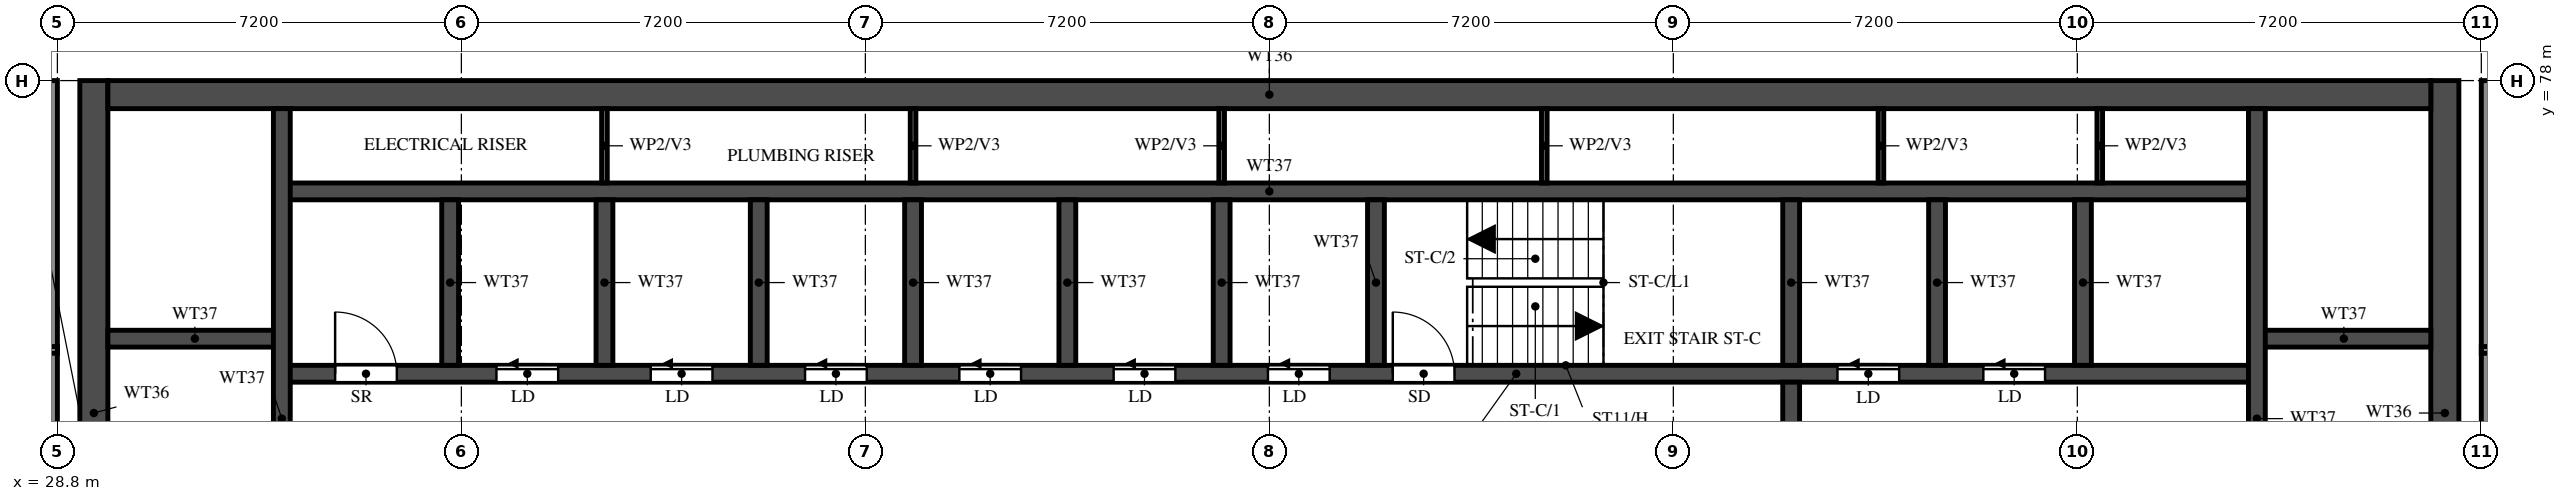
"""IFC4 building model, lengths in metres.
Left out: names, types, materials, properties, quantities, classifications, styles, units other than length and angle.
Written with IfcOpenShell. Run it as: python <this file> out.ifc"""

import sys

from ifc_helpers import new_model, si_unit, direction, frame, frame_2d, origin, place, context, subcontext, project, spatial, rectangle, extrude, element, fill, save


model = new_model("IFC4")
c1 = context("Model", 3, precision=1e-05, world=origin(), true_north=direction((0.0, 1.0)))
c2 = subcontext(c1, "Body", "Model", "MODEL_VIEW")
j1 = project(units=[si_unit("LENGTHUNIT", "METRE"), si_unit("PLANEANGLEUNIT", "RADIAN")], contexts=[c1])
p1 = place(None, origin())
s1 = spatial("IfcSite", under=j1, at=p1, CompositionType="ELEMENT")
p2 = place(p1, origin())
s2 = spatial("IfcBuilding", under=s1, at=p2, CompositionType="ELEMENT")
p3 = place(p2, frame((0.0, 0.0, 239.5)))
s3 = spatial("IfcBuildingStorey", under=s2, at=p3, CompositionType="ELEMENT", Elevation=239.5)
for number, where, z_axis, x_axis in (
    (1, (29.45, 66.15, 0.0), (0.0, 0.0, 1.0), (0.0, 1.0, 0.0)),
    (2, (71.35, 66.15, 0.0), (0.0, 0.0, 1.0), (0.0, 1.0, 0.0)),
):
    element("IfcWall", number, at=place(p3, frame(where, z_axis=z_axis, x_axis=x_axis)), inside=s3, PredefinedType="SHEAR", context=c2, shape_type="SweptSolid", body=[
        extrude(rectangle(XDim=11.85, YDim=0.5, at=frame_2d((5.925, 0.0))), origin(), (0.0, 0.0, 1.0), 3.22),
    ])
p4 = place(p3, frame((29.7, 77.75, 0.0), z_axis=(0.0, 0.0, 1.0), x_axis=(1.0, 0.0, 0.0)))
e3 = element("IfcWall", 3, at=p4, inside=s3, PredefinedType="SHEAR", context=c2, shape_type="SweptSolid", body=[
    extrude(rectangle(XDim=41.4, YDim=0.5, at=frame_2d((20.7, 0.0))), origin(), (0.0, 0.0, 1.0), 3.22),
])
p5 = place(p3, frame((32.8, 72.775, 0.0), z_axis=(0.0, 0.0, 1.0), x_axis=(1.0, 0.0, 0.0)))
e4 = element("IfcWall", 4, at=p5, inside=s3, PredefinedType="SHEAR", context=c2, shape_type="SweptSolid", body=[
    extrude(rectangle(XDim=35.2, YDim=0.3, at=frame_2d((17.6, 0.0))), origin(), (0.0, 0.0, 1.0), 3.22),
])
p6 = place(p5, frame((19.8, 0.0, 0.0)))
e5 = element("IfcOpeningElement", 5, at=p6, cuts=e4, PredefinedType="OPENING", context=c2, shape_type="SweptSolid", body=[
    extrude(rectangle(XDim=1.1, YDim=2.1, at=frame_2d((0.55, 1.05))), frame((0.0, 0.16, 0.0), z_axis=(0.0, -1.0, 0.0), x_axis=(1.0, 0.0, 0.0)), (0.0, 0.0, 1.0), 0.32),
])
p7 = place(p5, frame((27.725, 0.0, 0.0)))
e6 = element("IfcOpeningElement", 6, at=p7, cuts=e4, PredefinedType="OPENING", context=c2, shape_type="SweptSolid", body=[
    extrude(rectangle(XDim=1.1, YDim=2.1, at=frame_2d((0.55, 1.05))), frame((0.0, 0.16, 0.0), z_axis=(0.0, -1.0, 0.0), x_axis=(1.0, 0.0, 0.0)), (0.0, 0.0, 1.0), 0.32),
])
p8 = place(p5, frame((30.325, 0.0, 0.0)))
e7 = element("IfcOpeningElement", 7, at=p8, cuts=e4, PredefinedType="OPENING", context=c2, shape_type="SweptSolid", body=[
    extrude(rectangle(XDim=1.1, YDim=2.1, at=frame_2d((0.55, 1.05))), frame((0.0, 0.16, 0.0), z_axis=(0.0, -1.0, 0.0), x_axis=(1.0, 0.0, 0.0)), (0.0, 0.0, 1.0), 0.32),
])
p9 = place(p5, frame((3.825, 0.0, 0.0)))
e8 = element("IfcOpeningElement", 8, at=p9, cuts=e4, PredefinedType="OPENING", context=c2, shape_type="SweptSolid", body=[
    extrude(rectangle(XDim=1.1, YDim=2.1, at=frame_2d((0.55, 1.05))), frame((0.0, 0.16, 0.0), z_axis=(0.0, -1.0, 0.0), x_axis=(1.0, 0.0, 0.0)), (0.0, 0.0, 1.0), 0.32),
])
p10 = place(p5, frame((6.575, 0.0, 0.0)))
e9 = element("IfcOpeningElement", 9, at=p10, cuts=e4, PredefinedType="OPENING", context=c2, shape_type="SweptSolid", body=[
    extrude(rectangle(XDim=1.1, YDim=2.1, at=frame_2d((0.55, 1.05))), frame((0.0, 0.16, 0.0), z_axis=(0.0, -1.0, 0.0), x_axis=(1.0, 0.0, 0.0)), (0.0, 0.0, 1.0), 0.32),
])
p11 = place(p5, frame((9.325, 0.0, 0.0)))
e10 = element("IfcOpeningElement", 10, at=p11, cuts=e4, PredefinedType="OPENING", context=c2, shape_type="SweptSolid", body=[
    extrude(rectangle(XDim=1.1, YDim=2.1, at=frame_2d((0.55, 1.05))), frame((0.0, 0.16, 0.0), z_axis=(0.0, -1.0, 0.0), x_axis=(1.0, 0.0, 0.0)), (0.0, 0.0, 1.0), 0.32),
])
p12 = place(p5, frame((12.075, 0.0, 0.0)))
e11 = element("IfcOpeningElement", 11, at=p12, cuts=e4, PredefinedType="OPENING", context=c2, shape_type="SweptSolid", body=[
    extrude(rectangle(XDim=1.1, YDim=2.1, at=frame_2d((0.55, 1.05))), frame((0.0, 0.16, 0.0), z_axis=(0.0, -1.0, 0.0), x_axis=(1.0, 0.0, 0.0)), (0.0, 0.0, 1.0), 0.32),
])
p13 = place(p5, frame((14.825, 0.0, 0.0)))
e12 = element("IfcOpeningElement", 12, at=p13, cuts=e4, PredefinedType="OPENING", context=c2, shape_type="SweptSolid", body=[
    extrude(rectangle(XDim=1.1, YDim=2.1, at=frame_2d((0.55, 1.05))), frame((0.0, 0.16, 0.0), z_axis=(0.0, -1.0, 0.0), x_axis=(1.0, 0.0, 0.0)), (0.0, 0.0, 1.0), 0.32),
])
p14 = place(p5, frame((17.575, 0.0, 0.0)))
e13 = element("IfcOpeningElement", 13, at=p14, cuts=e4, PredefinedType="OPENING", context=c2, shape_type="SweptSolid", body=[
    extrude(rectangle(XDim=1.1, YDim=2.1, at=frame_2d((0.55, 1.05))), frame((0.0, 0.16, 0.0), z_axis=(0.0, -1.0, 0.0), x_axis=(1.0, 0.0, 0.0)), (0.0, 0.0, 1.0), 0.32),
])
p15 = place(p5, frame((0.95, 0.0, 0.0)))
e14 = element("IfcOpeningElement", 14, at=p15, cuts=e4, PredefinedType="OPENING", context=c2, shape_type="SweptSolid", body=[
    extrude(rectangle(XDim=1.1, YDim=2.1, at=frame_2d((0.55, 1.05))), frame((0.0, 0.16, 0.0), z_axis=(0.0, -1.0, 0.0), x_axis=(1.0, 0.0, 0.0)), (0.0, 0.0, 1.0), 0.32),
])
p16 = place(p3, frame((32.8, 76.025, 0.0), z_axis=(0.0, 0.0, 1.0), x_axis=(1.0, 0.0, 0.0)))
e15 = element("IfcWall", 15, at=p16, inside=s3, PredefinedType="SHEAR", context=c2, shape_type="SweptSolid", body=[
    extrude(rectangle(XDim=35.2, YDim=0.3, at=frame_2d((17.6, 0.0))), origin(), (0.0, 0.0, 1.0), 3.22),
])
for number, where, z_axis, x_axis in (
    (16, (29.7, 73.4, 0.0), (0.0, 0.0, 1.0), (1.0, 0.0, 0.0)),
    (17, (68.0, 73.4, 0.0), (0.0, 0.0, 1.0), (1.0, 0.0, 0.0)),
):
    element("IfcWall", number, at=place(p3, frame(where, z_axis=z_axis, x_axis=x_axis)), inside=s3, PredefinedType="SHEAR", context=c2, shape_type="SweptSolid", body=[
        extrude(rectangle(XDim=3.1, YDim=0.3, at=frame_2d((1.55, 0.0))), origin(), (0.0, 0.0, 1.0), 3.22),
    ])
p17 = place(p3, frame((32.8, 66.45, 0.0), z_axis=(0.0, 0.0, 1.0), x_axis=(0.0, 1.0, 0.0)))
e18 = element("IfcWall", 18, at=p17, inside=s3, PredefinedType="SHEAR", context=c2, shape_type="SweptSolid", body=[
    extrude(rectangle(XDim=11.05, YDim=0.3, at=frame_2d((5.525, 0.0))), origin(), (0.0, 0.0, 1.0), 3.22),
])
p18 = place(p3, frame((68.0, 66.45, 0.0), z_axis=(0.0, 0.0, 1.0), x_axis=(0.0, 1.0, 0.0)))
e19 = element("IfcWall", 19, at=p18, inside=s3, PredefinedType="SHEAR", context=c2, shape_type="SweptSolid", body=[
    extrude(rectangle(XDim=11.05, YDim=0.3, at=frame_2d((5.525, 0.0))), origin(), (0.0, 0.0, 1.0), 3.22),
])
p19 = place(p18, frame((0.15, 0.0, 0.0)))
e20 = element("IfcOpeningElement", 20, at=p19, cuts=e19, PredefinedType="OPENING", context=c2, shape_type="SweptSolid", body=[
    extrude(rectangle(XDim=1.1, YDim=2.1, at=frame_2d((0.55, 1.05))), frame((0.0, 0.16, 0.0), z_axis=(0.0, -1.0, 0.0), x_axis=(1.0, 0.0, 0.0)), (0.0, 0.0, 1.0), 0.32),
])
p20 = place(p3, frame((59.7, 66.45, 0.0), z_axis=(0.0, 0.0, 1.0), x_axis=(0.0, 1.0, 0.0)))
e21 = element("IfcWall", 21, at=p20, inside=s3, PredefinedType="SHEAR", context=c2, shape_type="SweptSolid", body=[
    extrude(rectangle(XDim=6.175, YDim=0.3, at=frame_2d((3.087, 0.0))), origin(), (0.0, 0.0, 1.0), 3.22),
])
p21 = place(p20, frame((3.85, 0.0, 0.0)))
e22 = element("IfcOpeningElement", 22, at=p21, cuts=e21, PredefinedType="OPENING", context=c2, shape_type="SweptSolid", body=[
    extrude(rectangle(XDim=1.2, YDim=2.1, at=frame_2d((0.6, 1.05))), frame((0.0, 0.16, 0.0), z_axis=(0.0, -1.0, 0.0), x_axis=(1.0, 0.0, 0.0)), (0.0, 0.0, 1.0), 0.32),
])
for number, where, z_axis, x_axis in (
    (23, (59.7, 72.925, 0.0), (0.0, 0.0, 1.0), (0.0, 1.0, 0.0)),
    (24, (35.8, 72.925, 0.0), (0.0, 0.0, 1.0), (0.0, 1.0, 0.0)),
    (25, (38.55, 72.925, 0.0), (0.0, 0.0, 1.0), (0.0, 1.0, 0.0)),
    (26, (41.3, 72.925, 0.0), (0.0, 0.0, 1.0), (0.0, 1.0, 0.0)),
    (27, (44.05, 72.925, 0.0), (0.0, 0.0, 1.0), (0.0, 1.0, 0.0)),
    (28, (46.8, 72.925, 0.0), (0.0, 0.0, 1.0), (0.0, 1.0, 0.0)),
    (29, (49.55, 72.925, 0.0), (0.0, 0.0, 1.0), (0.0, 1.0, 0.0)),
    (30, (52.3, 72.925, 0.0), (0.0, 0.0, 1.0), (0.0, 1.0, 0.0)),
    (31, (62.3, 72.925, 0.0), (0.0, 0.0, 1.0), (0.0, 1.0, 0.0)),
    (32, (64.9, 72.925, 0.0), (0.0, 0.0, 1.0), (0.0, 1.0, 0.0)),
):
    element("IfcWall", number, at=place(p3, frame(where, z_axis=z_axis, x_axis=x_axis)), inside=s3, PredefinedType="SHEAR", context=c2, shape_type="SweptSolid", body=[
        extrude(rectangle(XDim=2.95, YDim=0.3, at=frame_2d((1.475, 0.0))), origin(), (0.0, 0.0, 1.0), 3.22),
    ])
for number, where, z_axis, x_axis in (
    (33, (38.55, 76.175, 0.0), (0.0, 0.0, 1.0), (0.0, 1.0, 0.0)),
    (34, (44.05, 76.175, 0.0), (0.0, 0.0, 1.0), (0.0, 1.0, 0.0)),
    (35, (49.55, 76.175, 0.0), (0.0, 0.0, 1.0), (0.0, 1.0, 0.0)),
    (36, (55.3, 76.175, 0.0), (0.0, 0.0, 1.0), (0.0, 1.0, 0.0)),
    (37, (61.3, 76.175, 0.0), (0.0, 0.0, 1.0), (0.0, 1.0, 0.0)),
    (38, (65.2, 76.175, 0.0), (0.0, 0.0, 1.0), (0.0, 1.0, 0.0)),
):
    element("IfcWall", number, at=place(p3, frame(where, z_axis=z_axis, x_axis=x_axis)), inside=s3, PredefinedType="PARTITIONING", context=c2, shape_type="SweptSolid", body=[
        extrude(rectangle(XDim=1.325, YDim=0.1, at=frame_2d((0.663, 0.0))), origin(), (0.0, 0.0, 1.0), 3.22),
    ])
for number, where, z_axis, x_axis in (
    (39, (28.7, 62.4, 0.0), (0.0, 0.0, 1.0), (0.0, 1.0, 0.0)),
    (40, (72.1, 62.4, 0.0), (0.0, 0.0, 1.0), (0.0, 1.0, 0.0)),
):
    element("IfcWall", number, at=place(p3, frame(where, z_axis=z_axis, x_axis=x_axis)), inside=s3, PredefinedType="SOLIDWALL", context=c2, shape_type="SweptSolid", body=[
        extrude(rectangle(XDim=15.6, YDim=0.2, at=frame_2d((7.8, 0.0))), origin(), (0.0, 0.0, 1.0), 3.22),
    ])
p22 = place(p3, frame((18.525, 73.2, 0.0), z_axis=(0.0, 0.0, 1.0), x_axis=(1.0, 0.0, 0.0)))
e41 = element("IfcWall", 41, at=p22, inside=s3, PredefinedType="PARTITIONING", context=c2, shape_type="SweptSolid", body=[
    extrude(rectangle(XDim=10.275, YDim=0.12, at=frame_2d((5.138, 0.0))), origin(), (0.0, 0.0, 1.0), 2.32),
])
p23 = place(p22, frame((5.275, 0.0, 0.0)))
e42 = element("IfcOpeningElement", 42, at=p23, cuts=e41, PredefinedType="OPENING", context=c2, shape_type="SweptSolid", body=[
    extrude(rectangle(XDim=0.9, YDim=2.1, at=frame_2d((0.45, 1.05))), frame((0.0, 0.07, 0.0), z_axis=(0.0, -1.0, 0.0), x_axis=(1.0, 0.0, 0.0)), (0.0, 0.0, 1.0), 0.14),
])
p24 = place(p3, frame((72.0, 73.2, 0.0), z_axis=(0.0, 0.0, 1.0), x_axis=(1.0, 0.0, 0.0)))
e43 = element("IfcWall", 43, at=p24, inside=s3, PredefinedType="PARTITIONING", context=c2, shape_type="SweptSolid", body=[
    extrude(rectangle(XDim=10.275, YDim=0.12, at=frame_2d((5.137, 0.0))), origin(), (0.0, 0.0, 1.0), 2.32),
])
p25 = place(p24, frame((4.1, 0.0, 0.0)))
e44 = element("IfcOpeningElement", 44, at=p25, cuts=e43, PredefinedType="OPENING", context=c2, shape_type="SweptSolid", body=[
    extrude(rectangle(XDim=0.9, YDim=2.1, at=frame_2d((0.45, 1.05))), frame((0.0, 0.07, 0.0), z_axis=(0.0, -1.0, 0.0), x_axis=(1.0, 0.0, 0.0)), (0.0, 0.0, 1.0), 0.14),
])
p26 = place(p6, origin())
e45 = element("IfcDoor", 45, at=p26, inside=s3, OperationType="SINGLE_SWING_LEFT", PredefinedType="DOOR", context=c2, shape_type="SweptSolid", body=[
    extrude(rectangle(XDim=1.1, YDim=2.1, at=frame_2d((0.55, 1.05))), frame((0.0, 0.025, 0.0), z_axis=(0.0, -1.0, 0.0), x_axis=(1.0, 0.0, 0.0)), (0.0, 0.0, 1.0), 0.05),
])
fill(e5, e45)
p27 = place(p7, origin())
e46 = element("IfcDoor", 46, at=p27, inside=s3, OperationType="SLIDING_TO_LEFT", PredefinedType="DOOR", context=c2, shape_type="SweptSolid", body=[
    extrude(rectangle(XDim=1.1, YDim=2.1, at=frame_2d((0.55, 1.05))), frame((0.0, 0.025, 0.0), z_axis=(0.0, -1.0, 0.0), x_axis=(1.0, 0.0, 0.0)), (0.0, 0.0, 1.0), 0.05),
])
fill(e6, e46)
p28 = place(p8, origin())
e47 = element("IfcDoor", 47, at=p28, inside=s3, OperationType="SLIDING_TO_LEFT", PredefinedType="DOOR", context=c2, shape_type="SweptSolid", body=[
    extrude(rectangle(XDim=1.1, YDim=2.1, at=frame_2d((0.55, 1.05))), frame((0.0, 0.025, 0.0), z_axis=(0.0, -1.0, 0.0), x_axis=(1.0, 0.0, 0.0)), (0.0, 0.0, 1.0), 0.05),
])
fill(e7, e47)
p29 = place(p9, origin())
e48 = element("IfcDoor", 48, at=p29, inside=s3, OperationType="SLIDING_TO_LEFT", PredefinedType="DOOR", context=c2, shape_type="SweptSolid", body=[
    extrude(rectangle(XDim=1.1, YDim=2.1, at=frame_2d((0.55, 1.05))), frame((0.0, 0.025, 0.0), z_axis=(0.0, -1.0, 0.0), x_axis=(1.0, 0.0, 0.0)), (0.0, 0.0, 1.0), 0.05),
])
fill(e8, e48)
p30 = place(p10, origin())
e49 = element("IfcDoor", 49, at=p30, inside=s3, OperationType="SLIDING_TO_LEFT", PredefinedType="DOOR", context=c2, shape_type="SweptSolid", body=[
    extrude(rectangle(XDim=1.1, YDim=2.1, at=frame_2d((0.55, 1.05))), frame((0.0, 0.025, 0.0), z_axis=(0.0, -1.0, 0.0), x_axis=(1.0, 0.0, 0.0)), (0.0, 0.0, 1.0), 0.05),
])
fill(e9, e49)
p31 = place(p11, origin())
e50 = element("IfcDoor", 50, at=p31, inside=s3, OperationType="SLIDING_TO_LEFT", PredefinedType="DOOR", context=c2, shape_type="SweptSolid", body=[
    extrude(rectangle(XDim=1.1, YDim=2.1, at=frame_2d((0.55, 1.05))), frame((0.0, 0.025, 0.0), z_axis=(0.0, -1.0, 0.0), x_axis=(1.0, 0.0, 0.0)), (0.0, 0.0, 1.0), 0.05),
])
fill(e10, e50)
p32 = place(p12, origin())
e51 = element("IfcDoor", 51, at=p32, inside=s3, OperationType="SLIDING_TO_LEFT", PredefinedType="DOOR", context=c2, shape_type="SweptSolid", body=[
    extrude(rectangle(XDim=1.1, YDim=2.1, at=frame_2d((0.55, 1.05))), frame((0.0, 0.025, 0.0), z_axis=(0.0, -1.0, 0.0), x_axis=(1.0, 0.0, 0.0)), (0.0, 0.0, 1.0), 0.05),
])
fill(e11, e51)
p33 = place(p13, origin())
e52 = element("IfcDoor", 52, at=p33, inside=s3, OperationType="SLIDING_TO_LEFT", PredefinedType="DOOR", context=c2, shape_type="SweptSolid", body=[
    extrude(rectangle(XDim=1.1, YDim=2.1, at=frame_2d((0.55, 1.05))), frame((0.0, 0.025, 0.0), z_axis=(0.0, -1.0, 0.0), x_axis=(1.0, 0.0, 0.0)), (0.0, 0.0, 1.0), 0.05),
])
fill(e12, e52)
p34 = place(p14, origin())
e53 = element("IfcDoor", 53, at=p34, inside=s3, OperationType="SLIDING_TO_LEFT", PredefinedType="DOOR", context=c2, shape_type="SweptSolid", body=[
    extrude(rectangle(XDim=1.1, YDim=2.1, at=frame_2d((0.55, 1.05))), frame((0.0, 0.025, 0.0), z_axis=(0.0, -1.0, 0.0), x_axis=(1.0, 0.0, 0.0)), (0.0, 0.0, 1.0), 0.05),
])
fill(e13, e53)
p35 = place(p15, origin())
e54 = element("IfcDoor", 54, at=p35, inside=s3, OperationType="SINGLE_SWING_LEFT", PredefinedType="DOOR", context=c2, shape_type="SweptSolid", body=[
    extrude(rectangle(XDim=1.1, YDim=2.1, at=frame_2d((0.55, 1.05))), frame((0.0, 0.025, 0.0), z_axis=(0.0, -1.0, 0.0), x_axis=(1.0, 0.0, 0.0)), (0.0, 0.0, 1.0), 0.05),
])
fill(e14, e54)
save(model, sys.argv[1])
